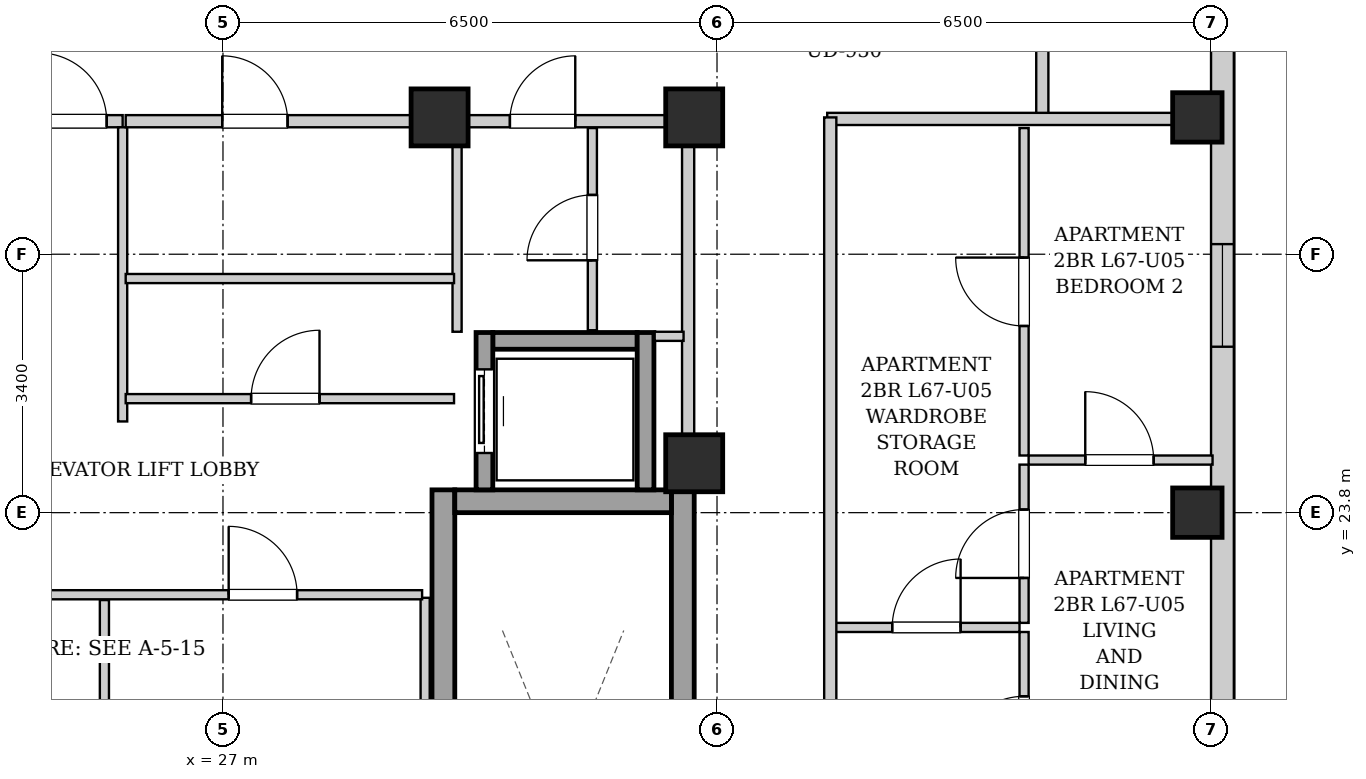
"""IFC4 building model, lengths in metres.
Left out: names, types, materials, properties, quantities, classifications, styles, units other than length and angle.
Written with IfcOpenShell. Run it as: python <this file> out.ifc"""

import sys

from ifc_helpers import new_model, si_unit, direction, frame, frame_2d, origin, origin_2d, place, context, subcontext, project, spatial, rectangle, extrude, element, fill, save


model = new_model("IFC4")
c1 = context("Model", 3, precision=1e-05, world=origin(), true_north=direction((0.0, 1.0)))
c2 = subcontext(c1, "Body", "Model", "MODEL_VIEW")
j1 = project(units=[si_unit("LENGTHUNIT", "METRE"), si_unit("PLANEANGLEUNIT", "RADIAN")], contexts=[c1])
p1 = place(None, origin())
s1 = spatial("IfcSite", under=j1, at=p1, CompositionType="ELEMENT")
p2 = place(p1, origin())
s2 = spatial("IfcBuilding", under=s1, at=p2, CompositionType="ELEMENT")
p3 = place(p2, frame((0.0, 0.0, 230.9)))
s3 = spatial("IfcBuildingStorey", under=s2, at=p3, CompositionType="ELEMENT", Elevation=230.9)
for number, where, z_axis, x_axis in (
    (1, (39.82, 23.8, 0.0), (0.0, 0.0, 1.0), (1.0, 0.0, 0.0)),
    (2, (39.82, 29.0, 0.0), (0.0, 0.0, 1.0), (1.0, 0.0, 0.0)),
):
    element("IfcColumn", number, at=place(p3, frame(where, z_axis=z_axis, x_axis=x_axis)), inside=s3, PredefinedType="COLUMN", context=c2, shape_type="SweptSolid", body=[
        extrude(rectangle(XDim=0.65, YDim=0.65, at=origin_2d()), origin(), (0.0, 0.0, 1.0), 3.4),
    ])
for number, where, z_axis, x_axis in (
    (3, (29.85, 29.0, 0.0), (0.0, 0.0, 1.0), (1.0, 0.0, 0.0)),
    (4, (33.2, 29.0, 0.0), (0.0, 0.0, 1.0), (1.0, 0.0, 0.0)),
    (5, (33.2, 24.45, 0.0), (0.0, 0.0, 1.0), (1.0, 0.0, 0.0)),
):
    element("IfcColumn", number, at=place(p3, frame(where, z_axis=z_axis, x_axis=x_axis)), inside=s3, PredefinedType="COLUMN", context=c2, shape_type="SweptSolid", body=[
        extrude(rectangle(XDim=0.75, YDim=0.75, at=origin_2d()), origin(), (0.0, 0.0, 1.0), 3.4),
    ])
p4 = place(p3, frame((40.15, 37.7, 0.0), z_axis=(0.0, 0.0, 1.0), x_axis=(0.0, -1.0, 0.0)))
e6 = element("IfcWall", 6, at=p4, inside=s3, PredefinedType="SOLIDWALL", context=c2, shape_type="SweptSolid", body=[
    extrude(rectangle(XDim=31.4, YDim=0.3, at=frame_2d((15.7, 0.0))), origin(), (0.0, 0.0, 1.0), 3.14),
])
p5 = place(p4, frame((28.396, 0.0, 0.55)))
e7 = element("IfcOpeningElement", 7, at=p5, cuts=e6, PredefinedType="OPENING", context=c2, shape_type="SweptSolid", body=[
    extrude(rectangle(XDim=1.35, YDim=1.2, at=frame_2d((0.675, 0.6))), frame((0.0, 0.16, 0.0), z_axis=(0.0, -1.0, 0.0), x_axis=(1.0, 0.0, 0.0)), (0.0, 0.0, 1.0), 0.32),
])
p6 = place(p4, frame((1.653, 0.0, 0.55)))
e8 = element("IfcOpeningElement", 8, at=p6, cuts=e6, PredefinedType="OPENING", context=c2, shape_type="SweptSolid", body=[
    extrude(rectangle(XDim=1.35, YDim=1.2, at=frame_2d((0.675, 0.6))), frame((0.0, 0.16, 0.0), z_axis=(0.0, -1.0, 0.0), x_axis=(1.0, 0.0, 0.0)), (0.0, 0.0, 1.0), 0.32),
])
p7 = place(p4, frame((19.683, 0.0, 0.55)))
e9 = element("IfcOpeningElement", 9, at=p7, cuts=e6, PredefinedType="OPENING", context=c2, shape_type="SweptSolid", body=[
    extrude(rectangle(XDim=1.35, YDim=1.2, at=frame_2d((0.675, 0.6))), frame((0.0, 0.16, 0.0), z_axis=(0.0, -1.0, 0.0), x_axis=(1.0, 0.0, 0.0)), (0.0, 0.0, 1.0), 0.32),
])
p8 = place(p4, frame((10.367, 0.0, 0.55)))
e10 = element("IfcOpeningElement", 10, at=p8, cuts=e6, PredefinedType="OPENING", context=c2, shape_type="SweptSolid", body=[
    extrude(rectangle(XDim=1.35, YDim=1.2, at=frame_2d((0.675, 0.6))), frame((0.0, 0.16, 0.0), z_axis=(0.0, -1.0, 0.0), x_axis=(1.0, 0.0, 0.0)), (0.0, 0.0, 1.0), 0.32),
])
for number, where, z_axis, x_axis in (
    (11, (29.9, 15.1, 0.0), (0.0, 0.0, 1.0), (0.0, 1.0, 0.0)),
    (12, (33.05, 15.1, 0.0), (0.0, 0.0, 1.0), (0.0, 1.0, 0.0)),
):
    element("IfcWall", number, at=place(p3, frame(where, z_axis=z_axis, x_axis=x_axis)), inside=s3, PredefinedType="SHEAR", context=c2, shape_type="SweptSolid", body=[
        extrude(rectangle(XDim=9.0, YDim=0.3, at=frame_2d((4.5, 0.0))), origin(), (0.0, 0.0, 1.0), 3.14),
    ])
p9 = place(p3, frame((30.05, 23.95, 0.0), z_axis=(0.0, 0.0, 1.0), x_axis=(1.0, 0.0, 0.0)))
e13 = element("IfcWall", 13, at=p9, inside=s3, PredefinedType="SHEAR", context=c2, shape_type="SweptSolid", body=[
    extrude(rectangle(XDim=2.85, YDim=0.3, at=frame_2d((1.425, 0.0))), origin(), (0.0, 0.0, 1.0), 3.14),
])
p10 = place(p3, frame((30.55, 26.06, 0.0), z_axis=(0.0, 0.0, 1.0), x_axis=(1.0, 0.0, 0.0)))
e14 = element("IfcWall", 14, at=p10, inside=s3, PredefinedType="SHEAR", context=c2, shape_type="SweptSolid", body=[
    extrude(rectangle(XDim=1.9, YDim=0.22, at=frame_2d((0.95, 0.0))), origin(), (0.0, 0.0, 1.0), 3.14),
])
p11 = place(p3, frame((30.44, 24.1, 0.0), z_axis=(0.0, 0.0, 1.0), x_axis=(0.0, 1.0, 0.0)))
e15 = element("IfcWall", 15, at=p11, inside=s3, PredefinedType="SHEAR", context=c2, shape_type="SweptSolid", body=[
    extrude(rectangle(XDim=2.07, YDim=0.22, at=frame_2d((1.035, 0.0))), origin(), (0.0, 0.0, 1.0), 3.14),
])
p12 = place(p11, frame((0.485, 0.0, 0.0)))
e16 = element("IfcOpeningElement", 16, at=p12, cuts=e15, PredefinedType="OPENING", context=c2, shape_type="SweptSolid", body=[
    extrude(rectangle(XDim=1.1, YDim=2.15, at=frame_2d((0.55, 1.075))), frame((0.0, 0.12, 0.0), z_axis=(0.0, -1.0, 0.0), x_axis=(1.0, 0.0, 0.0)), (0.0, 0.0, 1.0), 0.24),
])
p13 = place(p3, frame((32.56, 24.1, 0.0), z_axis=(0.0, 0.0, 1.0), x_axis=(0.0, 1.0, 0.0)))
e17 = element("IfcWall", 17, at=p13, inside=s3, PredefinedType="SHEAR", context=c2, shape_type="SweptSolid", body=[
    extrude(rectangle(XDim=2.07, YDim=0.22, at=frame_2d((1.035, 0.0))), origin(), (0.0, 0.0, 1.0), 3.14),
])
p14 = place(p3, frame((33.12, 24.12, 0.0), z_axis=(0.0, 0.0, 1.0), x_axis=(0.0, 1.0, 0.0)))
e18 = element("IfcWall", 18, at=p14, inside=s3, PredefinedType="PARTITIONING", context=c2, shape_type="SweptSolid", body=[
    extrude(rectangle(XDim=4.76, YDim=0.16, at=frame_2d((2.38, 0.0))), origin(), (0.0, 0.0, 1.0), 3.14),
])
p15 = place(p3, frame((24.36, 28.95, 0.0), z_axis=(0.0, 0.0, 1.0), x_axis=(1.0, 0.0, 0.0)))
e19 = element("IfcWall", 19, at=p15, inside=s3, PredefinedType="PARTITIONING", context=c2, shape_type="SweptSolid", body=[
    extrude(rectangle(XDim=1.32, YDim=0.16, at=frame_2d((0.66, 0.0))), origin(), (0.0, 0.0, 1.0), 2.668),
])
p16 = place(p15, frame((0.21, 0.0, 0.0)))
e20 = element("IfcOpeningElement", 20, at=p16, cuts=e19, PredefinedType="OPENING", context=c2, shape_type="SweptSolid", body=[
    extrude(rectangle(XDim=0.9, YDim=2.05, at=frame_2d((0.45, 1.025))), frame((0.0, 0.09, 0.0), z_axis=(0.0, -1.0, 0.0), x_axis=(1.0, 0.0, 0.0)), (0.0, 0.0, 1.0), 0.18),
])
p17 = place(p3, frame((25.68, 25.0, 0.0), z_axis=(0.0, 0.0, 1.0), x_axis=(0.0, 1.0, 0.0)))
e21 = element("IfcWall", 21, at=p17, inside=s3, PredefinedType="PARTITIONING", context=c2, shape_type="SweptSolid", body=[
    extrude(rectangle(XDim=3.87, YDim=0.12, at=frame_2d((1.935, 0.0))), origin(), (0.0, 0.0, 1.0), 3.14),
])
p18 = place(p3, frame((30.08, 26.18, 0.0), z_axis=(0.0, 0.0, 1.0), x_axis=(0.0, 1.0, 0.0)))
e22 = element("IfcWall", 22, at=p18, inside=s3, PredefinedType="PARTITIONING", context=c2, shape_type="SweptSolid", body=[
    extrude(rectangle(XDim=2.68, YDim=0.12, at=frame_2d((1.34, 0.0))), origin(), (0.0, 0.0, 1.0), 3.14),
])
p19 = place(p3, frame((32.68, 26.12, 0.0), z_axis=(0.0, 0.0, 1.0), x_axis=(1.0, 0.0, 0.0)))
e23 = element("IfcWall", 23, at=p19, inside=s3, PredefinedType="PARTITIONING", context=c2, shape_type="SweptSolid", body=[
    extrude(rectangle(XDim=0.38, YDim=0.12, at=frame_2d((0.19, 0.0))), origin(), (0.0, 0.0, 1.0), 3.14),
])
p20 = place(p3, frame((31.86, 26.2, 0.0), z_axis=(0.0, 0.0, 1.0), x_axis=(0.0, 1.0, 0.0)))
e24 = element("IfcWall", 24, at=p20, inside=s3, PredefinedType="PARTITIONING", context=c2, shape_type="SweptSolid", body=[
    extrude(rectangle(XDim=2.66, YDim=0.12, at=frame_2d((1.33, 0.0))), origin(), (0.0, 0.0, 1.0), 3.14),
])
p21 = place(p20, frame((0.92, 0.0, 0.0)))
e25 = element("IfcOpeningElement", 25, at=p21, cuts=e24, PredefinedType="OPENING", context=c2, shape_type="SweptSolid", body=[
    extrude(rectangle(XDim=0.86, YDim=2.05, at=frame_2d((0.43, 1.025))), frame((0.0, 0.07, 0.0), z_axis=(0.0, -1.0, 0.0), x_axis=(1.0, 0.0, 0.0)), (0.0, 0.0, 1.0), 0.14),
])
p22 = place(p3, frame((30.08, 28.95, 0.0), z_axis=(0.0, 0.0, 1.0), x_axis=(1.0, 0.0, 0.0)))
e26 = element("IfcWall", 26, at=p22, inside=s3, PredefinedType="PARTITIONING", context=c2, shape_type="SweptSolid", body=[
    extrude(rectangle(XDim=2.96, YDim=0.16, at=frame_2d((1.48, 0.0))), origin(), (0.0, 0.0, 1.0), 3.14),
])
p23 = place(p22, frame((0.695, 0.0, 0.0)))
e27 = element("IfcOpeningElement", 27, at=p23, cuts=e26, PredefinedType="OPENING", context=c2, shape_type="SweptSolid", body=[
    extrude(rectangle(XDim=0.86, YDim=2.05, at=frame_2d((0.43, 1.025))), frame((0.0, 0.09, 0.0), z_axis=(0.0, -1.0, 0.0), x_axis=(1.0, 0.0, 0.0)), (0.0, 0.0, 1.0), 0.18),
])
p24 = place(p3, frame((25.72, 26.88, 0.0), z_axis=(0.0, 0.0, 1.0), x_axis=(1.0, 0.0, 0.0)))
e28 = element("IfcWall", 28, at=p24, inside=s3, PredefinedType="PARTITIONING", context=c2, shape_type="SweptSolid", body=[
    extrude(rectangle(XDim=4.32, YDim=0.12, at=frame_2d((2.16, 0.0))), origin(), (0.0, 0.0, 1.0), 3.14),
])
p25 = place(p3, frame((25.72, 25.3, 0.0), z_axis=(0.0, 0.0, 1.0), x_axis=(1.0, 0.0, 0.0)))
e29 = element("IfcWall", 29, at=p25, inside=s3, PredefinedType="PARTITIONING", context=c2, shape_type="SweptSolid", body=[
    extrude(rectangle(XDim=4.32, YDim=0.12, at=frame_2d((2.16, 0.0))), origin(), (0.0, 0.0, 1.0), 3.14),
])
p26 = place(p25, frame((1.65, 0.0, 0.0)))
e30 = element("IfcOpeningElement", 30, at=p26, cuts=e29, PredefinedType="OPENING", context=c2, shape_type="SweptSolid", body=[
    extrude(rectangle(XDim=0.9, YDim=2.05, at=frame_2d((0.45, 1.025))), frame((0.0, 0.07, 0.0), z_axis=(0.0, -1.0, 0.0), x_axis=(1.0, 0.0, 0.0)), (0.0, 0.0, 1.0), 0.14),
])
p27 = place(p3, frame((25.72, 28.95, 0.0), z_axis=(0.0, 0.0, 1.0), x_axis=(1.0, 0.0, 0.0)))
e31 = element("IfcWall", 31, at=p27, inside=s3, PredefinedType="PARTITIONING", context=c2, shape_type="SweptSolid", body=[
    extrude(rectangle(XDim=4.32, YDim=0.16, at=frame_2d((2.16, 0.0))), origin(), (0.0, 0.0, 1.0), 2.668),
])
p28 = place(p27, frame((1.27, 0.0, 0.0)))
e32 = element("IfcOpeningElement", 32, at=p28, cuts=e31, PredefinedType="OPENING", context=c2, shape_type="SweptSolid", body=[
    extrude(rectangle(XDim=0.86, YDim=2.05, at=frame_2d((0.43, 1.025))), frame((0.0, 0.09, 0.0), z_axis=(0.0, -1.0, 0.0), x_axis=(1.0, 0.0, 0.0)), (0.0, 0.0, 1.0), 0.18),
])
p29 = place(p3, frame((29.66, 20.62, 0.0), z_axis=(0.0, 0.0, 1.0), x_axis=(0.0, 1.0, 0.0)))
e33 = element("IfcWall", 33, at=p29, inside=s3, PredefinedType="PARTITIONING", context=c2, shape_type="SweptSolid", body=[
    extrude(rectangle(XDim=2.06, YDim=0.12, at=frame_2d((1.03, 0.0))), origin(), (0.0, 0.0, 1.0), 3.14),
])
p30 = place(p3, frame((25.44, 20.65, 0.0), z_axis=(0.0, 0.0, 1.0), x_axis=(0.0, 1.0, 0.0)))
e34 = element("IfcWall", 34, at=p30, inside=s3, PredefinedType="PARTITIONING", context=c2, shape_type="SweptSolid", body=[
    extrude(rectangle(XDim=2.0, YDim=0.12, at=frame_2d((1.0, 0.0))), origin(), (0.0, 0.0, 1.0), 3.14),
])
p31 = place(p3, frame((22.35, 22.72, 0.0), z_axis=(0.0, 0.0, 1.0), x_axis=(1.0, 0.0, 0.0)))
e35 = element("IfcWall", 35, at=p31, inside=s3, PredefinedType="PARTITIONING", context=c2, shape_type="SweptSolid", body=[
    extrude(rectangle(XDim=7.27, YDim=0.12, at=frame_2d((3.635, 0.0))), origin(), (0.0, 0.0, 1.0), 3.14),
])
p32 = place(p31, frame((1.175, 0.0, 0.0)))
e36 = element("IfcOpeningElement", 36, at=p32, cuts=e35, PredefinedType="OPENING", context=c2, shape_type="SweptSolid", body=[
    extrude(rectangle(XDim=0.9, YDim=2.05, at=frame_2d((0.45, 1.025))), frame((0.0, 0.07, 0.0), z_axis=(0.0, -1.0, 0.0), x_axis=(1.0, 0.0, 0.0)), (0.0, 0.0, 1.0), 0.14),
])
p33 = place(p31, frame((4.725, 0.0, 0.0)))
e37 = element("IfcOpeningElement", 37, at=p33, cuts=e35, PredefinedType="OPENING", context=c2, shape_type="SweptSolid", body=[
    extrude(rectangle(XDim=0.9, YDim=2.05, at=frame_2d((0.45, 1.025))), frame((0.0, 0.07, 0.0), z_axis=(0.0, -1.0, 0.0), x_axis=(1.0, 0.0, 0.0)), (0.0, 0.0, 1.0), 0.14),
])
p34 = place(p3, frame((37.78, 28.98, 0.0), z_axis=(0.0, 0.0, 1.0), x_axis=(0.0, 1.0, 0.0)))
e38 = element("IfcWall", 38, at=p34, inside=s3, PredefinedType="PARTITIONING", context=c2, shape_type="SweptSolid", body=[
    extrude(rectangle(XDim=1.58, YDim=0.16, at=frame_2d((0.79, 0.0))), origin(), (0.0, 0.0, 1.0), 3.14),
])
p35 = place(p3, frame((34.95, 28.98, 0.0), z_axis=(0.0, 0.0, 1.0), x_axis=(1.0, 0.0, 0.0)))
e39 = element("IfcWall", 39, at=p35, inside=s3, PredefinedType="PARTITIONING", context=c2, shape_type="SweptSolid", body=[
    extrude(rectangle(XDim=5.07, YDim=0.16, at=frame_2d((2.535, 0.0))), origin(), (0.0, 0.0, 1.0), 2.668),
])
p36 = place(p3, frame((35.03, 22.29, 0.0), z_axis=(0.0, 0.0, 1.0), x_axis=(1.0, 0.0, 0.0)))
e40 = element("IfcWall", 40, at=p36, inside=s3, PredefinedType="PARTITIONING", context=c2, shape_type="SweptSolid", body=[
    extrude(rectangle(XDim=2.45, YDim=0.12, at=frame_2d((1.225, 0.0))), origin(), (0.0, 0.0, 1.0), 3.14),
])
p37 = place(p36, frame((0.775, 0.0, 0.0)))
e41 = element("IfcOpeningElement", 41, at=p37, cuts=e40, PredefinedType="OPENING", context=c2, shape_type="SweptSolid", body=[
    extrude(rectangle(XDim=0.9, YDim=2.05, at=frame_2d((0.45, 1.025))), frame((0.0, 0.07, 0.0), z_axis=(0.0, -1.0, 0.0), x_axis=(1.0, 0.0, 0.0)), (0.0, 0.0, 1.0), 0.14),
])
p38 = place(p3, frame((37.54, 22.35, 0.0), z_axis=(0.0, 0.0, 1.0), x_axis=(0.0, 1.0, 0.0)))
e42 = element("IfcWall", 42, at=p38, inside=s3, PredefinedType="PARTITIONING", context=c2, shape_type="SweptSolid", body=[
    extrude(rectangle(XDim=2.082, YDim=0.12, at=frame_2d((1.041, 0.0))), origin(), (0.0, 0.0, 1.0), 3.14),
])
p39 = place(p38, frame((0.591, 0.0, 0.0)))
e43 = element("IfcOpeningElement", 43, at=p39, cuts=e42, PredefinedType="OPENING", context=c2, shape_type="SweptSolid", body=[
    extrude(rectangle(XDim=0.9, YDim=2.05, at=frame_2d((0.45, 1.025))), frame((0.0, 0.07, 0.0), z_axis=(0.0, -1.0, 0.0), x_axis=(1.0, 0.0, 0.0)), (0.0, 0.0, 1.0), 0.14),
])
p40 = place(p3, frame((37.54, 24.552, 0.0), z_axis=(0.0, 0.0, 1.0), x_axis=(0.0, 1.0, 0.0)))
e44 = element("IfcWall", 44, at=p40, inside=s3, PredefinedType="PARTITIONING", context=c2, shape_type="SweptSolid", body=[
    extrude(rectangle(XDim=4.308, YDim=0.12, at=frame_2d((2.154, 0.0))), origin(), (0.0, 0.0, 1.0), 3.14),
])
p41 = place(p40, frame((1.704, 0.0, 0.0)))
e45 = element("IfcOpeningElement", 45, at=p41, cuts=e44, PredefinedType="OPENING", context=c2, shape_type="SweptSolid", body=[
    extrude(rectangle(XDim=0.9, YDim=2.05, at=frame_2d((0.45, 1.025))), frame((0.0, 0.07, 0.0), z_axis=(0.0, -1.0, 0.0), x_axis=(1.0, 0.0, 0.0)), (0.0, 0.0, 1.0), 0.14),
])
p42 = place(p3, frame((37.54, 19.638, 0.0), z_axis=(0.0, 0.0, 1.0), x_axis=(0.0, 1.0, 0.0)))
e46 = element("IfcWall", 46, at=p42, inside=s3, PredefinedType="PARTITIONING", context=c2, shape_type="SweptSolid", body=[
    extrude(rectangle(XDim=2.592, YDim=0.12, at=frame_2d((1.296, 0.0))), origin(), (0.0, 0.0, 1.0), 3.14),
])
p43 = place(p42, frame((0.846, 0.0, 0.0)))
e47 = element("IfcOpeningElement", 47, at=p43, cuts=e46, PredefinedType="OPENING", context=c2, shape_type="SweptSolid", body=[
    extrude(rectangle(XDim=0.9, YDim=2.05, at=frame_2d((0.45, 1.025))), frame((0.0, 0.07, 0.0), z_axis=(0.0, -1.0, 0.0), x_axis=(1.0, 0.0, 0.0)), (0.0, 0.0, 1.0), 0.14),
])
p44 = place(p3, frame((37.6, 24.492, 0.0), z_axis=(0.0, 0.0, 1.0), x_axis=(1.0, 0.0, 0.0)))
e48 = element("IfcWall", 48, at=p44, inside=s3, PredefinedType="PARTITIONING", context=c2, shape_type="SweptSolid", body=[
    extrude(rectangle(XDim=2.42, YDim=0.12, at=frame_2d((1.21, 0.0))), origin(), (0.0, 0.0, 1.0), 2.878),
])
p45 = place(p44, frame((0.745, 0.0, 0.0)))
e49 = element("IfcOpeningElement", 49, at=p45, cuts=e48, PredefinedType="OPENING", context=c2, shape_type="SweptSolid", body=[
    extrude(rectangle(XDim=0.9, YDim=2.05, at=frame_2d((0.45, 1.025))), frame((0.0, 0.07, 0.0), z_axis=(0.0, -1.0, 0.0), x_axis=(1.0, 0.0, 0.0)), (0.0, 0.0, 1.0), 0.14),
])
p46 = place(p3, frame((34.99, 15.07, 0.0), z_axis=(0.0, 0.0, 1.0), x_axis=(0.0, 1.0, 0.0)))
e50 = element("IfcWall", 50, at=p46, inside=s3, PredefinedType="PARTITIONING", context=c2, shape_type="SweptSolid", body=[
    extrude(rectangle(XDim=13.93, YDim=0.16, at=frame_2d((6.965, 0.0))), origin(), (0.0, 0.0, 1.0), 3.14),
])
p47 = place(p46, frame((4.385, 0.0, 0.0)))
e51 = element("IfcOpeningElement", 51, at=p47, cuts=e50, PredefinedType="OPENING", context=c2, shape_type="SweptSolid", body=[
    extrude(rectangle(XDim=0.95, YDim=2.1, at=frame_2d((0.475, 1.05))), frame((0.0, 0.09, 0.0), z_axis=(0.0, -1.0, 0.0), x_axis=(1.0, 0.0, 0.0)), (0.0, 0.0, 1.0), 0.18),
])
p48 = place(p12, origin())
e52 = element("IfcDoor", 52, at=p48, inside=s3, OperationType="SLIDING_TO_LEFT", PredefinedType="DOOR", context=c2, shape_type="SweptSolid", body=[
    extrude(rectangle(XDim=1.1, YDim=2.15, at=frame_2d((0.55, 1.075))), frame((0.0, 0.025, 0.0), z_axis=(0.0, -1.0, 0.0), x_axis=(1.0, 0.0, 0.0)), (0.0, 0.0, 1.0), 0.05),
])
fill(e16, e52)
p49 = place(p16, origin())
e53 = element("IfcDoor", 53, at=p49, inside=s3, OperationType="SINGLE_SWING_LEFT", PredefinedType="DOOR", context=c2, shape_type="SweptSolid", body=[
    extrude(rectangle(XDim=0.9, YDim=2.05, at=frame_2d((0.45, 1.025))), frame((0.0, 0.025, 0.0), z_axis=(0.0, -1.0, 0.0), x_axis=(1.0, 0.0, 0.0)), (0.0, 0.0, 1.0), 0.05),
])
fill(e20, e53)
p50 = place(p21, origin())
e54 = element("IfcDoor", 54, at=p50, inside=s3, OperationType="SINGLE_SWING_LEFT", PredefinedType="DOOR", context=c2, shape_type="SweptSolid", body=[
    extrude(rectangle(XDim=0.86, YDim=2.05, at=frame_2d((0.43, 1.025))), frame((0.0, 0.025, 0.0), z_axis=(0.0, -1.0, 0.0), x_axis=(1.0, 0.0, 0.0)), (0.0, 0.0, 1.0), 0.05),
])
fill(e25, e54)
p51 = place(p23, origin())
e55 = element("IfcDoor", 55, at=p51, inside=s3, OperationType="SINGLE_SWING_RIGHT", PredefinedType="DOOR", context=c2, shape_type="SweptSolid", body=[
    extrude(rectangle(XDim=0.86, YDim=2.05, at=frame_2d((0.43, 1.025))), frame((0.0, 0.025, 0.0), z_axis=(0.0, -1.0, 0.0), x_axis=(1.0, 0.0, 0.0)), (0.0, 0.0, 1.0), 0.05),
])
fill(e27, e55)
p52 = place(p26, origin())
e56 = element("IfcDoor", 56, at=p52, inside=s3, OperationType="SINGLE_SWING_RIGHT", PredefinedType="DOOR", context=c2, shape_type="SweptSolid", body=[
    extrude(rectangle(XDim=0.9, YDim=2.05, at=frame_2d((0.45, 1.025))), frame((0.0, 0.025, 0.0), z_axis=(0.0, -1.0, 0.0), x_axis=(1.0, 0.0, 0.0)), (0.0, 0.0, 1.0), 0.05),
])
fill(e30, e56)
p53 = place(p28, origin())
e57 = element("IfcDoor", 57, at=p53, inside=s3, OperationType="SINGLE_SWING_LEFT", PredefinedType="DOOR", context=c2, shape_type="SweptSolid", body=[
    extrude(rectangle(XDim=0.86, YDim=2.05, at=frame_2d((0.43, 1.025))), frame((0.0, 0.025, 0.0), z_axis=(0.0, -1.0, 0.0), x_axis=(1.0, 0.0, 0.0)), (0.0, 0.0, 1.0), 0.05),
])
fill(e32, e57)
p54 = place(p33, origin())
e58 = element("IfcDoor", 58, at=p54, inside=s3, OperationType="SINGLE_SWING_LEFT", PredefinedType="DOOR", context=c2, shape_type="SweptSolid", body=[
    extrude(rectangle(XDim=0.9, YDim=2.05, at=frame_2d((0.45, 1.025))), frame((0.0, 0.025, 0.0), z_axis=(0.0, -1.0, 0.0), x_axis=(1.0, 0.0, 0.0)), (0.0, 0.0, 1.0), 0.05),
])
fill(e37, e58)
p55 = place(p37, origin())
e59 = element("IfcDoor", 59, at=p55, inside=s3, OperationType="SINGLE_SWING_RIGHT", PredefinedType="DOOR", context=c2, shape_type="SweptSolid", body=[
    extrude(rectangle(XDim=0.9, YDim=2.05, at=frame_2d((0.45, 1.025))), frame((0.0, 0.025, 0.0), z_axis=(0.0, -1.0, 0.0), x_axis=(1.0, 0.0, 0.0)), (0.0, 0.0, 1.0), 0.05),
])
fill(e41, e59)
p56 = place(p39, origin())
e60 = element("IfcDoor", 60, at=p56, inside=s3, OperationType="SINGLE_SWING_LEFT", PredefinedType="DOOR", context=c2, shape_type="SweptSolid", body=[
    extrude(rectangle(XDim=0.9, YDim=2.05, at=frame_2d((0.45, 1.025))), frame((0.0, 0.025, 0.0), z_axis=(0.0, -1.0, 0.0), x_axis=(1.0, 0.0, 0.0)), (0.0, 0.0, 1.0), 0.05),
])
fill(e43, e60)
p57 = place(p41, origin())
e61 = element("IfcDoor", 61, at=p57, inside=s3, OperationType="SINGLE_SWING_RIGHT", PredefinedType="DOOR", context=c2, shape_type="SweptSolid", body=[
    extrude(rectangle(XDim=0.9, YDim=2.05, at=frame_2d((0.45, 1.025))), frame((0.0, 0.025, 0.0), z_axis=(0.0, -1.0, 0.0), x_axis=(1.0, 0.0, 0.0)), (0.0, 0.0, 1.0), 0.05),
])
fill(e45, e61)
p58 = place(p43, origin())
e62 = element("IfcDoor", 62, at=p58, inside=s3, OperationType="SINGLE_SWING_LEFT", PredefinedType="DOOR", context=c2, shape_type="SweptSolid", body=[
    extrude(rectangle(XDim=0.9, YDim=2.05, at=frame_2d((0.45, 1.025))), frame((0.0, 0.025, 0.0), z_axis=(0.0, -1.0, 0.0), x_axis=(1.0, 0.0, 0.0)), (0.0, 0.0, 1.0), 0.05),
])
fill(e47, e62)
p59 = place(p45, origin())
e63 = element("IfcDoor", 63, at=p59, inside=s3, OperationType="SINGLE_SWING_LEFT", PredefinedType="DOOR", context=c2, shape_type="SweptSolid", body=[
    extrude(rectangle(XDim=0.9, YDim=2.05, at=frame_2d((0.45, 1.025))), frame((0.0, 0.025, 0.0), z_axis=(0.0, -1.0, 0.0), x_axis=(1.0, 0.0, 0.0)), (0.0, 0.0, 1.0), 0.05),
])
fill(e49, e63)
p60 = place(p8, origin())
e64 = element("IfcWindow", 64, at=p60, inside=s3, PartitioningType="SINGLE_PANEL", PredefinedType="WINDOW", context=c2, shape_type="SweptSolid", body=[
    extrude(rectangle(XDim=1.35, YDim=1.2, at=frame_2d((0.675, 0.6))), frame((0.0, 0.03, 0.0), z_axis=(0.0, -1.0, 0.0), x_axis=(1.0, 0.0, 0.0)), (0.0, 0.0, 1.0), 0.06),
])
fill(e10, e64)
save(model, sys.argv[1])
